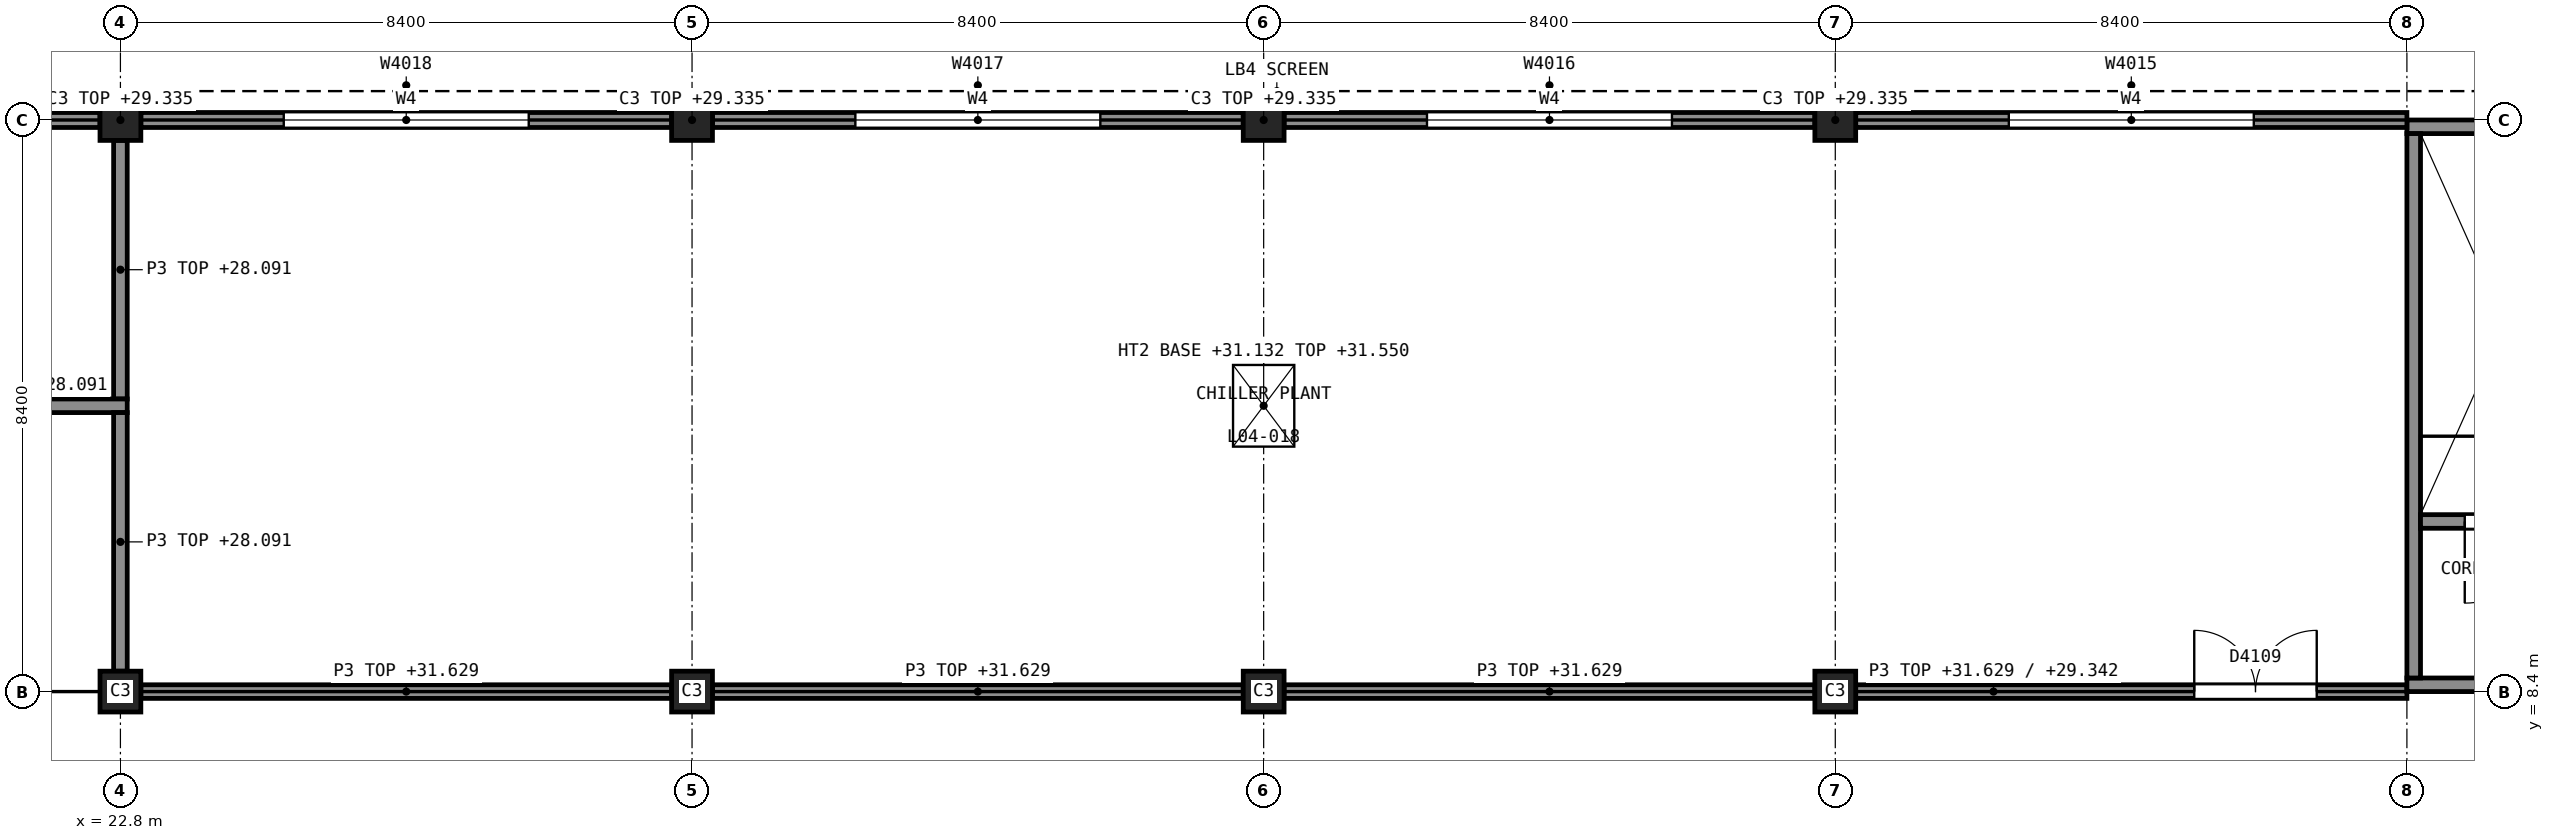
"""IFC4 building model, lengths in metres.
Left out: names, types, materials, properties, quantities, classifications, styles, units other than length and angle.
Written with IfcOpenShell. Run it as: python <this file> out.ifc"""

import sys

from ifc_helpers import new_model, si_unit, direction, frame, frame_2d, origin, origin_2d, place, context, subcontext, project, spatial, polyline, rectangle, outline, extrude, element, fill, save


model = new_model("IFC4")
c1 = context("Model", 3, precision=1e-05, world=origin(), true_north=direction((0.0, 1.0)))
c2 = subcontext(c1, "Body", "Model", "MODEL_VIEW")
j1 = project(units=[si_unit("LENGTHUNIT", "METRE"), si_unit("PLANEANGLEUNIT", "RADIAN")], contexts=[c1])
p1 = place(None, origin())
s1 = spatial("IfcSite", under=j1, at=p1, CompositionType="ELEMENT")
p2 = place(p1, origin())
s2 = spatial("IfcBuilding", under=s1, at=p2, CompositionType="ELEMENT")
p3 = place(p2, frame((0.0, 0.0, 20.0)))
s3 = spatial("IfcBuildingStorey", under=s2, at=p3, CompositionType="ELEMENT", Elevation=20.0)
p4 = place(p3, frame((14.4, 16.9, 0.0), z_axis=(0.0, 0.0, 1.0), x_axis=(1.0, 0.0, 0.0)))
e1 = element("IfcWall", 1, at=p4, inside=s3, PredefinedType="SHEAR", context=c2, shape_type="SweptSolid", body=[
    extrude(rectangle(XDim=8.4, YDim=0.2, at=frame_2d((4.2, 0.0))), origin(), (0.0, 0.0, 1.0), 8.8),
])
p5 = place(p3, frame((22.7, 17.0, 0.0), z_axis=(0.0, 0.0, 1.0), x_axis=(0.0, 1.0, 0.0)))
e2 = element("IfcWall", 2, at=p5, inside=s3, PredefinedType="SHEAR", context=c2, shape_type="SweptSolid", body=[
    extrude(rectangle(XDim=8.0, YDim=0.2, at=frame_2d((4.0, 0.0))), origin(), (0.0, 0.0, 1.0), 8.775),
])
p6 = place(p2, frame((0.0, 0.0, 25.0)))
s4 = spatial("IfcBuildingStorey", under=s2, at=p6, CompositionType="ELEMENT", Elevation=25.0)
p7 = place(p6, frame((56.4, 8.5, 0.0), z_axis=(0.0, 0.0, 1.0), x_axis=(1.0, 0.0, 0.0)))
e3 = element("IfcWall", 3, at=p7, inside=s4, PredefinedType="SHEAR", context=c2, shape_type="SweptSolid", body=[
    extrude(rectangle(XDim=8.4, YDim=0.2, at=frame_2d((4.2, 0.0))), origin(), (0.0, 0.0, 1.0), 7.097),
])
p8 = place(p7, frame((3.3, 0.0, 0.0)))
e4 = element("IfcOpeningElement", 4, at=p8, cuts=e3, PredefinedType="OPENING", context=c2, shape_type="SweptSolid", body=[
    extrude(rectangle(XDim=1.8, YDim=2.1, at=frame_2d((0.9, 1.05))), frame((0.0, 0.11, 0.0), z_axis=(0.0, -1.0, 0.0), x_axis=(1.0, 0.0, 0.0)), (0.0, 0.0, 1.0), 0.22),
])
p9 = place(p6, frame((56.4, 16.7, 0.0), z_axis=(0.0, 0.0, 1.0), x_axis=(1.0, 0.0, 0.0)))
e5 = element("IfcWall", 5, at=p9, inside=s4, PredefinedType="SHEAR", context=c2, shape_type="SweptSolid", body=[
    extrude(rectangle(XDim=8.4, YDim=0.2, at=frame_2d((4.2, 0.0))), origin(), (0.0, 0.0, 1.0), 4.433),
])
p10 = place(p6, frame((56.5, 8.6, 0.0), z_axis=(0.0, 0.0, 1.0), x_axis=(0.0, 1.0, 0.0)))
e6 = element("IfcWall", 6, at=p10, inside=s4, PredefinedType="SHEAR", context=c2, shape_type="SweptSolid", body=[
    extrude(outline(polyline([(0.0, 0.0), (8.0, 0.0), (8.0, 4.465), (7.704, 4.561), (7.407, 4.658), (6.519, 4.946), (6.222, 5.043), (5.333, 5.331), (5.037, 5.428), (4.444, 5.62), (4.148, 5.717), (3.259, 6.005), (2.963, 6.102), (2.074, 6.39), (1.778, 6.487), (1.185, 6.679), (0.889, 6.776), (0.0, 7.064), (0.0, 0.0)])), frame((0.0, 0.1, 0.0), z_axis=(0.0, -1.0, 0.0), x_axis=(1.0, 0.0, 0.0)), (0.0, 0.0, 1.0), 0.2),
])
p11 = place(p6, frame((56.6, 10.9, 0.0), z_axis=(0.0, 0.0, 1.0), x_axis=(1.0, 0.0, 0.0)))
e7 = element("IfcWall", 7, at=p11, inside=s4, PredefinedType="SHEAR", context=c2, shape_type="SweptSolid", body=[
    extrude(rectangle(XDim=8.0, YDim=0.2, at=frame_2d((4.0, 0.0))), origin(), (0.0, 0.0, 1.0), 6.317),
])
p12 = place(p11, frame((0.65, 0.0, 0.0)))
e8 = element("IfcOpeningElement", 8, at=p12, cuts=e7, PredefinedType="OPENING", context=c2, shape_type="SweptSolid", body=[
    extrude(rectangle(XDim=1.2, YDim=2.1, at=frame_2d((0.6, 1.05))), frame((0.0, 0.11, 0.0), z_axis=(0.0, -1.0, 0.0), x_axis=(1.0, 0.0, 0.0)), (0.0, 0.0, 1.0), 0.22),
])
p13 = place(p11, frame((6.15, 0.0, 0.0)))
e9 = element("IfcOpeningElement", 9, at=p13, cuts=e7, PredefinedType="OPENING", context=c2, shape_type="SweptSolid", body=[
    extrude(rectangle(XDim=1.2, YDim=2.1, at=frame_2d((0.6, 1.05))), frame((0.0, 0.11, 0.0), z_axis=(0.0, -1.0, 0.0), x_axis=(1.0, 0.0, 0.0)), (0.0, 0.0, 1.0), 0.22),
])
p14 = place(p11, frame((3.45, 0.0, 0.0)))
e10 = element("IfcOpeningElement", 10, at=p14, cuts=e7, PredefinedType="OPENING", context=c2, shape_type="SweptSolid", body=[
    extrude(rectangle(XDim=1.1, YDim=2.1, at=frame_2d((0.55, 1.05))), frame((0.0, 0.11, 0.0), z_axis=(0.0, -1.0, 0.0), x_axis=(1.0, 0.0, 0.0)), (0.0, 0.0, 1.0), 0.22),
])
p15 = place(p6, frame((22.8, 8.4, 0.0), z_axis=(0.0, 0.0, 1.0), x_axis=(1.0, 0.0, 0.0)))
e11 = element("IfcColumn", 11, at=p15, inside=s4, PredefinedType="COLUMN", context=c2, shape_type="SweptSolid", body=[
    extrude(rectangle(XDim=0.6, YDim=0.6, at=origin_2d()), origin(), (0.0, 0.0, 1.0), 5.0),
])
p16 = place(p6, frame((22.8, 16.8, 0.0), z_axis=(0.0, 0.0, 1.0), x_axis=(1.0, 0.0, 0.0)))
e12 = element("IfcColumn", 12, at=p16, inside=s4, PredefinedType="COLUMN", context=c2, shape_type="SweptSolid", body=[
    extrude(rectangle(XDim=0.6, YDim=0.6, at=origin_2d()), origin(), (0.0, 0.0, 1.0), 4.335),
])
p17 = place(p6, frame((31.2, 8.4, 0.0), z_axis=(0.0, 0.0, 1.0), x_axis=(1.0, 0.0, 0.0)))
e13 = element("IfcColumn", 13, at=p17, inside=s4, PredefinedType="COLUMN", context=c2, shape_type="SweptSolid", body=[
    extrude(rectangle(XDim=0.6, YDim=0.6, at=origin_2d()), origin(), (0.0, 0.0, 1.0), 5.0),
])
p18 = place(p6, frame((31.2, 16.8, 0.0), z_axis=(0.0, 0.0, 1.0), x_axis=(1.0, 0.0, 0.0)))
e14 = element("IfcColumn", 14, at=p18, inside=s4, PredefinedType="COLUMN", context=c2, shape_type="SweptSolid", body=[
    extrude(rectangle(XDim=0.6, YDim=0.6, at=origin_2d()), origin(), (0.0, 0.0, 1.0), 4.335),
])
p19 = place(p6, frame((39.6, 8.4, 0.0), z_axis=(0.0, 0.0, 1.0), x_axis=(1.0, 0.0, 0.0)))
e15 = element("IfcColumn", 15, at=p19, inside=s4, PredefinedType="COLUMN", context=c2, shape_type="SweptSolid", body=[
    extrude(rectangle(XDim=0.6, YDim=0.6, at=origin_2d()), origin(), (0.0, 0.0, 1.0), 5.0),
])
p20 = place(p6, frame((39.6, 16.8, 0.0), z_axis=(0.0, 0.0, 1.0), x_axis=(1.0, 0.0, 0.0)))
e16 = element("IfcColumn", 16, at=p20, inside=s4, PredefinedType="COLUMN", context=c2, shape_type="SweptSolid", body=[
    extrude(rectangle(XDim=0.6, YDim=0.6, at=origin_2d()), origin(), (0.0, 0.0, 1.0), 4.335),
])
p21 = place(p6, frame((48.0, 8.4, 0.0), z_axis=(0.0, 0.0, 1.0), x_axis=(1.0, 0.0, 0.0)))
e17 = element("IfcColumn", 17, at=p21, inside=s4, PredefinedType="COLUMN", context=c2, shape_type="SweptSolid", body=[
    extrude(rectangle(XDim=0.6, YDim=0.6, at=origin_2d()), origin(), (0.0, 0.0, 1.0), 5.0),
])
p22 = place(p6, frame((48.0, 16.8, 0.0), z_axis=(0.0, 0.0, 1.0), x_axis=(1.0, 0.0, 0.0)))
e18 = element("IfcColumn", 18, at=p22, inside=s4, PredefinedType="COLUMN", context=c2, shape_type="SweptSolid", body=[
    extrude(rectangle(XDim=0.6, YDim=0.6, at=origin_2d()), origin(), (0.0, 0.0, 1.0), 4.335),
])
p23 = place(p6, frame((48.3, 16.8, 0.0), z_axis=(0.0, 0.0, 1.0), x_axis=(1.0, 0.0, 0.0)))
e19 = element("IfcWall", 19, at=p23, inside=s4, PredefinedType="SOLIDWALL", context=c2, shape_type="SweptSolid", body=[
    extrude(rectangle(XDim=8.1, YDim=0.22, at=frame_2d((4.05, 0.0))), origin(), (0.0, 0.0, 1.0), 4.334),
])
p24 = place(p23, frame((2.25, 0.0, 0.9)))
e20 = element("IfcOpeningElement", 20, at=p24, cuts=e19, PredefinedType="OPENING", context=c2, shape_type="SweptSolid", body=[
    extrude(rectangle(XDim=3.6, YDim=1.5, at=frame_2d((1.8, 0.75))), frame((0.0, 0.12, 0.0), z_axis=(0.0, -1.0, 0.0), x_axis=(1.0, 0.0, 0.0)), (0.0, 0.0, 1.0), 0.24),
])
p25 = place(p6, frame((39.9, 16.8, 0.0), z_axis=(0.0, 0.0, 1.0), x_axis=(1.0, 0.0, 0.0)))
e21 = element("IfcWall", 21, at=p25, inside=s4, PredefinedType="SOLIDWALL", context=c2, shape_type="SweptSolid", body=[
    extrude(rectangle(XDim=7.8, YDim=0.22, at=frame_2d((3.9, 0.0))), origin(), (0.0, 0.0, 1.0), 4.334),
])
p26 = place(p25, frame((2.1, 0.0, 0.9)))
e22 = element("IfcOpeningElement", 22, at=p26, cuts=e21, PredefinedType="OPENING", context=c2, shape_type="SweptSolid", body=[
    extrude(rectangle(XDim=3.6, YDim=1.5, at=frame_2d((1.8, 0.75))), frame((0.0, 0.12, 0.0), z_axis=(0.0, -1.0, 0.0), x_axis=(1.0, 0.0, 0.0)), (0.0, 0.0, 1.0), 0.24),
])
p27 = place(p6, frame((31.5, 16.8, 0.0), z_axis=(0.0, 0.0, 1.0), x_axis=(1.0, 0.0, 0.0)))
e23 = element("IfcWall", 23, at=p27, inside=s4, PredefinedType="SOLIDWALL", context=c2, shape_type="SweptSolid", body=[
    extrude(rectangle(XDim=7.8, YDim=0.22, at=frame_2d((3.9, 0.0))), origin(), (0.0, 0.0, 1.0), 4.334),
])
p28 = place(p27, frame((2.1, 0.0, 0.9)))
e24 = element("IfcOpeningElement", 24, at=p28, cuts=e23, PredefinedType="OPENING", context=c2, shape_type="SweptSolid", body=[
    extrude(rectangle(XDim=3.6, YDim=1.5, at=frame_2d((1.8, 0.75))), frame((0.0, 0.12, 0.0), z_axis=(0.0, -1.0, 0.0), x_axis=(1.0, 0.0, 0.0)), (0.0, 0.0, 1.0), 0.24),
])
p29 = place(p6, frame((23.1, 16.8, 0.0), z_axis=(0.0, 0.0, 1.0), x_axis=(1.0, 0.0, 0.0)))
e25 = element("IfcWall", 25, at=p29, inside=s4, PredefinedType="SOLIDWALL", context=c2, shape_type="SweptSolid", body=[
    extrude(rectangle(XDim=7.8, YDim=0.22, at=frame_2d((3.9, 0.0))), origin(), (0.0, 0.0, 1.0), 4.334),
])
p30 = place(p29, frame((2.1, 0.0, 0.9)))
e26 = element("IfcOpeningElement", 26, at=p30, cuts=e25, PredefinedType="OPENING", context=c2, shape_type="SweptSolid", body=[
    extrude(rectangle(XDim=3.6, YDim=1.5, at=frame_2d((1.8, 0.75))), frame((0.0, 0.12, 0.0), z_axis=(0.0, -1.0, 0.0), x_axis=(1.0, 0.0, 0.0)), (0.0, 0.0, 1.0), 0.24),
])
p31 = place(p6, frame((14.7, 16.8, 3.8), z_axis=(0.0, 0.0, 1.0), x_axis=(1.0, 0.0, 0.0)))
e27 = element("IfcWall", 27, at=p31, inside=s4, PredefinedType="SOLIDWALL", context=c2, shape_type="SweptSolid", body=[
    extrude(rectangle(XDim=7.8, YDim=0.22, at=frame_2d((3.9, 0.0))), origin(), (0.0, 0.0, 1.0), 0.534),
])
p32 = place(p6, frame((22.8, 12.7, 0.0), z_axis=(0.0, 0.0, 1.0), x_axis=(0.0, 1.0, 0.0)))
e28 = element("IfcWall", 28, at=p32, inside=s4, PredefinedType="PARTITIONING", context=c2, shape_type="SweptSolid", body=[
    extrude(rectangle(XDim=3.8, YDim=0.2, at=frame_2d((1.9, 0.0))), origin(), (0.0, 0.0, 1.0), 3.091),
])
p33 = place(p6, frame((14.4, 12.6, 0.0), z_axis=(0.0, 0.0, 1.0), x_axis=(1.0, 0.0, 0.0)))
e29 = element("IfcWall", 29, at=p33, inside=s4, PredefinedType="PARTITIONING", context=c2, shape_type="SweptSolid", body=[
    extrude(outline(polyline([(0.0, 0.0), (8.5, 0.0), (8.5, 3.091), (8.4, 3.091), (7.35, 5.265), (5.25, 5.265), (4.2, 3.091), (3.15, 5.265), (0.0, 5.265), (0.0, 0.0)])), frame((0.0, 0.1, 0.0), z_axis=(0.0, -1.0, 0.0), x_axis=(1.0, 0.0, 0.0)), (0.0, 0.0, 1.0), 0.2),
])
p34 = place(p33, frame((1.775, 0.0, 0.0)))
e30 = element("IfcOpeningElement", 30, at=p34, cuts=e29, PredefinedType="OPENING", context=c2, shape_type="SweptSolid", body=[
    extrude(rectangle(XDim=1.0, YDim=2.1, at=frame_2d((0.5, 1.05))), frame((0.0, 0.11, 0.0), z_axis=(0.0, -1.0, 0.0), x_axis=(1.0, 0.0, 0.0)), (0.0, 0.0, 1.0), 0.22),
])
p35 = place(p6, frame((23.1, 8.4, 0.0), z_axis=(0.0, 0.0, 1.0), x_axis=(1.0, 0.0, 0.0)))
e31 = element("IfcWall", 31, at=p35, inside=s4, PredefinedType="PARTITIONING", context=c2, shape_type="SweptSolid", body=[
    extrude(outline(polyline([(0.0, 0.0), (7.8, 0.0), (7.8, 6.629), (6.3, 6.629), (5.25, 3.091), (4.2, 6.629), (2.1, 6.629), (1.05, 3.091), (0.0, 6.629), (0.0, 0.0)])), frame((0.0, 0.1, 0.0), z_axis=(0.0, -1.0, 0.0), x_axis=(1.0, 0.0, 0.0)), (0.0, 0.0, 1.0), 0.2),
])
for number, where, z_axis, x_axis in (
    (32, (31.5, 8.4, 0.0), (0.0, 0.0, 1.0), (1.0, 0.0, 0.0)),
    (33, (39.9, 8.4, 0.0), (0.0, 0.0, 1.0), (1.0, 0.0, 0.0)),
):
    element("IfcWall", number, at=place(p6, frame(where, z_axis=z_axis, x_axis=x_axis)), inside=s4, PredefinedType="PARTITIONING", context=c2, shape_type="SweptSolid", body=[
        extrude(outline(polyline([(0.0, 0.0), (7.8, 0.0), (7.8, 6.629), (6.3, 6.629), (5.25, 3.091), (4.2, 6.629), (2.1, 6.629), (1.05, 3.091), (0.0, 6.629), (0.0, 0.0)])), frame((0.0, 0.1, 0.0), z_axis=(0.0, -1.0, 0.0), x_axis=(1.0, 0.0, 0.0)), (0.0, 0.0, 1.0), 0.2),
    ])
p36 = place(p6, frame((48.3, 8.4, 0.0), z_axis=(0.0, 0.0, 1.0), x_axis=(1.0, 0.0, 0.0)))
e34 = element("IfcWall", 34, at=p36, inside=s4, PredefinedType="PARTITIONING", context=c2, shape_type="SweptSolid", body=[
    extrude(outline(polyline([(0.0, 0.0), (8.1, 0.0), (8.1, 4.342), (7.35, 6.629), (6.3, 6.629), (5.25, 3.091), (4.2, 6.629), (2.1, 6.629), (1.05, 3.091), (0.0, 6.629), (0.0, 0.0)])), frame((0.0, 0.1, 0.0), z_axis=(0.0, -1.0, 0.0), x_axis=(1.0, 0.0, 0.0)), (0.0, 0.0, 1.0), 0.2),
])
p37 = place(p36, frame((4.975, 0.0, 0.0)))
e35 = element("IfcOpeningElement", 35, at=p37, cuts=e34, PredefinedType="OPENING", context=c2, shape_type="SweptSolid", body=[
    extrude(rectangle(XDim=1.8, YDim=2.1, at=frame_2d((0.9, 1.05))), frame((0.0, 0.11, 0.0), z_axis=(0.0, -1.0, 0.0), x_axis=(1.0, 0.0, 0.0)), (0.0, 0.0, 1.0), 0.22),
])
p38 = place(p6, frame((22.8, 8.7, 0.0), z_axis=(0.0, 0.0, 1.0), x_axis=(0.0, 1.0, 0.0)))
e36 = element("IfcWall", 36, at=p38, inside=s4, PredefinedType="PARTITIONING", context=c2, shape_type="SweptSolid", body=[
    extrude(rectangle(XDim=3.8, YDim=0.2, at=frame_2d((1.9, 0.0))), origin(), (0.0, 0.0, 1.0), 3.091),
])
p39 = place(p24, origin())
e37 = element("IfcWindow", 37, at=p39, inside=s4, PartitioningType="DOUBLE_PANEL_VERTICAL", PredefinedType="WINDOW", context=c2, shape_type="SweptSolid", body=[
    extrude(rectangle(XDim=3.6, YDim=1.5, at=frame_2d((1.8, 0.75))), frame((0.0, -0.03, 0.0), z_axis=(0.0, -1.0, 0.0), x_axis=(1.0, 0.0, 0.0)), (0.0, 0.0, 1.0), 0.06),
])
fill(e20, e37)
p40 = place(p26, origin())
e38 = element("IfcWindow", 38, at=p40, inside=s4, PartitioningType="DOUBLE_PANEL_VERTICAL", PredefinedType="WINDOW", context=c2, shape_type="SweptSolid", body=[
    extrude(rectangle(XDim=3.6, YDim=1.5, at=frame_2d((1.8, 0.75))), frame((0.0, -0.03, 0.0), z_axis=(0.0, -1.0, 0.0), x_axis=(1.0, 0.0, 0.0)), (0.0, 0.0, 1.0), 0.06),
])
fill(e22, e38)
p41 = place(p28, origin())
e39 = element("IfcWindow", 39, at=p41, inside=s4, PartitioningType="DOUBLE_PANEL_VERTICAL", PredefinedType="WINDOW", context=c2, shape_type="SweptSolid", body=[
    extrude(rectangle(XDim=3.6, YDim=1.5, at=frame_2d((1.8, 0.75))), frame((0.0, -0.03, 0.0), z_axis=(0.0, -1.0, 0.0), x_axis=(1.0, 0.0, 0.0)), (0.0, 0.0, 1.0), 0.06),
])
fill(e24, e39)
p42 = place(p30, origin())
e40 = element("IfcWindow", 40, at=p42, inside=s4, PartitioningType="DOUBLE_PANEL_VERTICAL", PredefinedType="WINDOW", context=c2, shape_type="SweptSolid", body=[
    extrude(rectangle(XDim=3.6, YDim=1.5, at=frame_2d((1.8, 0.75))), frame((0.0, -0.03, 0.0), z_axis=(0.0, -1.0, 0.0), x_axis=(1.0, 0.0, 0.0)), (0.0, 0.0, 1.0), 0.06),
])
fill(e26, e40)
p43 = place(p6, frame((6.0, 8.4, 7.729), z_axis=(0.0, 0.309015235516, 0.951057087781), x_axis=(1.0, 0.0, 0.0)))
p44 = place(p43, frame((33.6, 4.416, 0.01), z_axis=(0.0, 0.0, -1.0), x_axis=(-1.0, 0.0, 0.0)))
p45 = place(p44, frame((0.0, 0.0, 0.01)))
e41 = element("IfcDoor", 41, at=p45, inside=s4, OperationType="SINGLE_SWING_LEFT", PredefinedType="TRAPDOOR", context=c2, shape_type="SweptSolid", body=[
    extrude(rectangle(XDim=0.9, YDim=1.2, at=origin_2d()), origin(), (0.0, 0.0, 1.0), 0.05),
])
p46 = place(p37, origin())
e42 = element("IfcDoor", 42, at=p46, inside=s4, OperationType="DOUBLE_DOOR_SINGLE_SWING", PredefinedType="DOOR", context=c2, shape_type="SweptSolid", body=[
    extrude(rectangle(XDim=1.8, YDim=2.1, at=frame_2d((0.9, 1.05))), frame((0.0, 0.025, 0.0), z_axis=(0.0, -1.0, 0.0), x_axis=(1.0, 0.0, 0.0)), (0.0, 0.0, 1.0), 0.05),
])
fill(e35, e42)
p47 = place(p12, origin())
e43 = element("IfcDoor", 43, at=p47, inside=s4, OperationType="SINGLE_SWING_LEFT", PredefinedType="DOOR", context=c2, shape_type="SweptSolid", body=[
    extrude(rectangle(XDim=1.2, YDim=2.1, at=frame_2d((0.6, 1.05))), frame((0.0, 0.025, 0.0), z_axis=(0.0, -1.0, 0.0), x_axis=(1.0, 0.0, 0.0)), (0.0, 0.0, 1.0), 0.05),
])
fill(e8, e43)
save(model, sys.argv[1])
